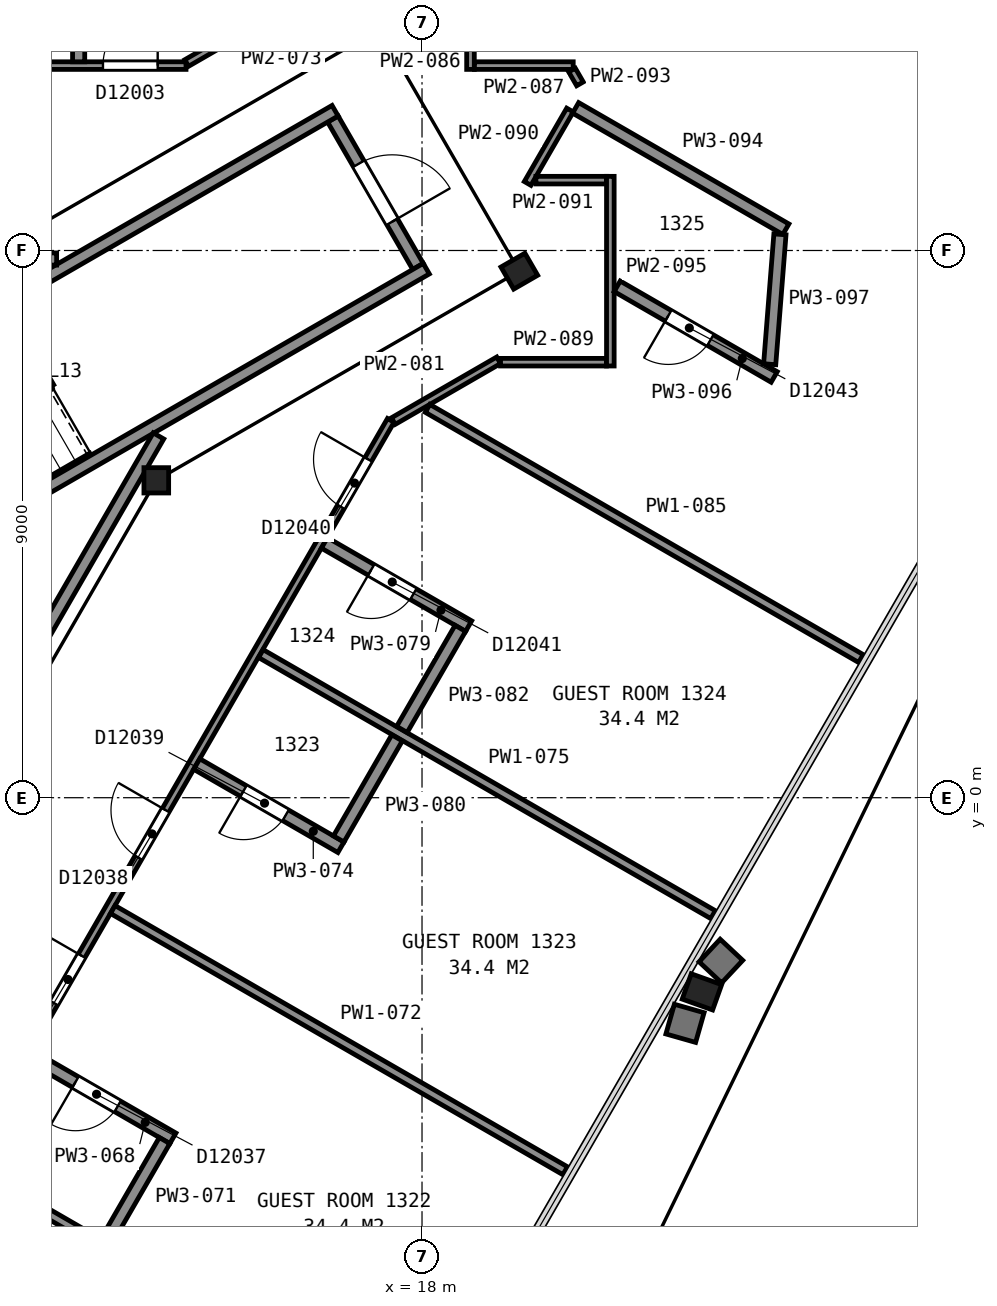
"""IFC4 building model, lengths in metres.
Left out: names, types, materials, properties, quantities, classifications, styles, units other than length and angle.
Written with IfcOpenShell. Run it as: python <this file> out.ifc"""

import sys

from ifc_helpers import new_model, si_unit, direction, frame, frame_2d, origin, origin_2d, place, context, subcontext, project, spatial, rectangle, i_section, extrude, element, fill, save


model = new_model("IFC4")
c1 = context("Model", 3, precision=1e-05, world=origin(), true_north=direction((0.0, 1.0)))
c2 = subcontext(c1, "Body", "Model", "MODEL_VIEW")
j1 = project(units=[si_unit("LENGTHUNIT", "METRE"), si_unit("PLANEANGLEUNIT", "RADIAN")], contexts=[c1])
p1 = place(None, origin())
s1 = spatial("IfcSite", under=j1, at=p1, CompositionType="ELEMENT")
p2 = place(p1, origin())
s2 = spatial("IfcBuilding", under=s1, at=p2, CompositionType="ELEMENT")
p3 = place(p2, frame((0.0, 0.0, 62.0)))
s3 = spatial("IfcBuildingStorey", under=s2, at=p3, CompositionType="ELEMENT", Elevation=62.0)
p4 = place(p3, frame((22.512, -3.161, 0.025), z_axis=(0.077516125089, -0.027689225938, 0.996606520708), x_axis=(-0.499992893591, -0.865902493262, 0.014831672882)))
e1 = element("IfcColumn", 1, at=p4, inside=s3, PredefinedType="COLUMN", context=c2, shape_type="SweptSolid", body=[
    extrude(i_section(OverallWidth=0.442, OverallDepth=0.531, WebThickness=0.066, FlangeThickness=0.106, FilletRadius=0.015, at=origin_2d()), origin(), (0.0, 0.0, 1.0), 3.562),
])
p5 = place(p3, frame((13.63, 5.22, 0.0), z_axis=(0.0, 0.0, 1.0), x_axis=(1.0, 0.0, 0.0)))
e2 = element("IfcColumn", 2, at=p5, inside=s3, PredefinedType="COLUMN", context=c2, shape_type="SweptSolid", body=[
    extrude(i_section(OverallWidth=0.406, OverallDepth=0.417, WebThickness=0.03, FlangeThickness=0.048, FilletRadius=0.015, at=origin_2d()), origin(), (0.0, 0.0, 1.0), 3.6),
])
p6 = place(p3, frame((19.6, 8.66, 0.0), z_axis=(0.0, 0.0, 1.0), x_axis=(0.5, -0.866025403784, 0.0)))
e3 = element("IfcColumn", 3, at=p6, inside=s3, PredefinedType="COLUMN", context=c2, shape_type="SweptSolid", body=[
    extrude(i_section(OverallWidth=0.419, OverallDepth=0.455, WebThickness=0.042, FlangeThickness=0.068, FilletRadius=0.015, at=origin_2d()), origin(), (0.0, 0.0, 1.0), 3.6),
])
p7 = place(p3, frame((17.934, 8.738, 0.0), z_axis=(0.0, 0.0, 1.0), x_axis=(-0.49998411664, 0.866034573852, 0.0)))
e4 = element("IfcWall", 4, at=p7, inside=s3, PredefinedType="PARTITIONING", context=c2, shape_type="SweptSolid", body=[
    extrude(rectangle(XDim=2.8, YDim=0.2, at=frame_2d((1.4, 0.0))), origin(), (0.0, 0.0, 1.0), 3.35),
])
p8 = place(p7, frame((0.85, 0.0, 0.0)))
e5 = element("IfcOpeningElement", 5, at=p8, cuts=e4, PredefinedType="OPENING", context=c2, shape_type="SweptSolid", body=[
    extrude(rectangle(XDim=1.1, YDim=2.1, at=frame_2d((0.55, 1.05))), frame((0.0, 0.11, 0.0), z_axis=(0.0, -1.0, 0.0), x_axis=(1.0, 0.0, 0.0)), (0.0, 0.0, 1.0), 0.22),
])
for number, where, z_axis, x_axis in (
    (6, (6.178, 5.299, 0.0), (0.0, 0.0, 1.0), (0.866, 0.5, 0.0)),
    (7, (7.678, 2.701, 0.0), (0.0, 0.0, 1.0), (0.866, 0.5, 0.0)),
):
    element("IfcWall", number, at=place(p3, frame(where, z_axis=z_axis, x_axis=x_axis)), inside=s3, PredefinedType="PARTITIONING", context=c2, shape_type="SweptSolid", body=[
        extrude(rectangle(XDim=12.0, YDim=0.2, at=frame_2d((6.0, 0.0))), origin(), (0.0, 0.0, 1.0), 3.35),
    ])
p9 = place(p3, frame((6.177, 8.86, 0.0), z_axis=(0.0, 0.0, 1.0), x_axis=(1.0, 0.0, 0.0)))
e8 = element("IfcWall", 8, at=p9, inside=s3, PredefinedType="PARTITIONING", context=c2, shape_type="SweptSolid", body=[
    extrude(rectangle(XDim=5.814, YDim=0.2, at=frame_2d((2.907, 0.0))), origin(), (0.0, 0.0, 1.0), 3.35),
])
p10 = place(p3, frame((8.492, -3.012, 0.0), z_axis=(0.0, 0.0, 1.0), x_axis=(0.499972957231, 0.866041016371, 0.0)))
e9 = element("IfcWall", 9, at=p10, inside=s3, PredefinedType="PARTITIONING", context=c2, shape_type="SweptSolid", body=[
    extrude(rectangle(XDim=10.349, YDim=0.2, at=frame_2d((5.174, 0.0))), origin(), (0.0, 0.0, 1.0), 3.35),
])
p11 = place(p3, frame((-9.036, 12.041, 0.0), z_axis=(0.0, 0.0, 1.0), x_axis=(1.0, 0.0, 0.0)))
e10 = element("IfcWall", 10, at=p11, inside=s3, PredefinedType="PARTITIONING", context=c2, shape_type="SweptSolid", body=[
    extrude(rectangle(XDim=23.154, YDim=0.125, at=frame_2d((11.577, 0.0))), origin(), (0.0, 0.0, 1.0), 2.613),
])
p12 = place(p11, frame((21.789, 0.0, 0.0)))
e11 = element("IfcOpeningElement", 11, at=p12, cuts=e10, PredefinedType="OPENING", context=c2, shape_type="SweptSolid", body=[
    extrude(rectangle(XDim=0.9, YDim=2.1, at=frame_2d((0.45, 1.05))), frame((0.0, 0.073, 0.0), z_axis=(0.0, -1.0, 0.0), x_axis=(1.0, 0.0, 0.0)), (0.0, 0.0, 1.0), 0.145),
])
p13 = place(p11, frame((15.375, 0.0, 0.0)))
e12 = element("IfcOpeningElement", 12, at=p13, cuts=e10, PredefinedType="OPENING", context=c2, shape_type="SweptSolid", body=[
    extrude(rectangle(XDim=0.9, YDim=2.1, at=frame_2d((0.45, 1.05))), frame((0.0, 0.073, 0.0), z_axis=(0.0, -1.0, 0.0), x_axis=(1.0, 0.0, 0.0)), (0.0, 0.0, 1.0), 0.145),
])
p14 = place(p11, frame((12.81, 0.0, 0.0)))
e13 = element("IfcOpeningElement", 13, at=p14, cuts=e10, PredefinedType="OPENING", context=c2, shape_type="SweptSolid", body=[
    extrude(rectangle(XDim=0.9, YDim=2.1, at=frame_2d((0.45, 1.05))), frame((0.0, 0.073, 0.0), z_axis=(0.0, -1.0, 0.0), x_axis=(1.0, 0.0, 0.0)), (0.0, 0.0, 1.0), 0.145),
])
p15 = place(p11, frame((6.046, 0.0, 0.0)))
e14 = element("IfcOpeningElement", 14, at=p15, cuts=e10, PredefinedType="OPENING", context=c2, shape_type="SweptSolid", body=[
    extrude(rectangle(XDim=0.9, YDim=2.1, at=frame_2d((0.45, 1.05))), frame((0.0, 0.073, 0.0), z_axis=(0.0, -1.0, 0.0), x_axis=(1.0, 0.0, 0.0)), (0.0, 0.0, 1.0), 0.145),
])
p16 = place(p11, frame((3.224, 0.0, 0.0)))
e15 = element("IfcOpeningElement", 15, at=p16, cuts=e10, PredefinedType="OPENING", context=c2, shape_type="SweptSolid", body=[
    extrude(rectangle(XDim=0.9, YDim=2.1, at=frame_2d((0.45, 1.05))), frame((0.0, 0.073, 0.0), z_axis=(0.0, -1.0, 0.0), x_axis=(1.0, 0.0, 0.0)), (0.0, 0.0, 1.0), 0.145),
])
p17 = place(p3, frame((17.486, 6.206, 0.0), z_axis=(0.0, 0.0, 1.0), x_axis=(-0.499990458811, -0.866030912322, 0.0)))
e16 = element("IfcWall", 16, at=p17, inside=s3, PredefinedType="PARTITIONING", context=c2, shape_type="SweptSolid", body=[
    extrude(rectangle(XDim=27.441, YDim=0.125, at=frame_2d((13.721, 0.0))), origin(), (0.0, 0.0, 1.0), 2.613),
])
p18 = place(p17, frame((20.529, 0.0, 0.0)))
e17 = element("IfcOpeningElement", 17, at=p18, cuts=e16, PredefinedType="OPENING", context=c2, shape_type="SweptSolid", body=[
    extrude(rectangle(XDim=0.9, YDim=2.1, at=frame_2d((0.45, 1.05))), frame((0.0, 0.073, 0.0), z_axis=(0.0, -1.0, 0.0), x_axis=(1.0, 0.0, 0.0)), (0.0, 0.0, 1.0), 0.145),
])
p19 = place(p17, frame((17.516, 0.0, 0.0)))
e18 = element("IfcOpeningElement", 18, at=p19, cuts=e16, PredefinedType="OPENING", context=c2, shape_type="SweptSolid", body=[
    extrude(rectangle(XDim=0.9, YDim=2.1, at=frame_2d((0.45, 1.05))), frame((0.0, 0.073, 0.0), z_axis=(0.0, -1.0, 0.0), x_axis=(1.0, 0.0, 0.0)), (0.0, 0.0, 1.0), 0.145),
])
p20 = place(p17, frame((10.168, 0.0, 0.0)))
e19 = element("IfcOpeningElement", 19, at=p20, cuts=e16, PredefinedType="OPENING", context=c2, shape_type="SweptSolid", body=[
    extrude(rectangle(XDim=0.9, YDim=2.1, at=frame_2d((0.45, 1.05))), frame((0.0, 0.073, 0.0), z_axis=(0.0, -1.0, 0.0), x_axis=(1.0, 0.0, 0.0)), (0.0, 0.0, 1.0), 0.145),
])
p21 = place(p17, frame((7.403, 0.0, 0.0)))
e20 = element("IfcOpeningElement", 20, at=p21, cuts=e16, PredefinedType="OPENING", context=c2, shape_type="SweptSolid", body=[
    extrude(rectangle(XDim=0.9, YDim=2.1, at=frame_2d((0.45, 1.05))), frame((0.0, 0.073, 0.0), z_axis=(0.0, -1.0, 0.0), x_axis=(1.0, 0.0, 0.0)), (0.0, 0.0, 1.0), 0.145),
])
p22 = place(p17, frame((0.741, 0.0, 0.0)))
e21 = element("IfcOpeningElement", 21, at=p22, cuts=e16, PredefinedType="OPENING", context=c2, shape_type="SweptSolid", body=[
    extrude(rectangle(XDim=0.9, YDim=2.1, at=frame_2d((0.45, 1.05))), frame((0.0, 0.073, 0.0), z_axis=(0.0, -1.0, 0.0), x_axis=(1.0, 0.0, 0.0)), (0.0, 0.0, 1.0), 0.145),
])
p23 = place(p3, frame((10.482, -6.051, 0.0), z_axis=(0.0, 0.0, 1.0), x_axis=(0.865978298045, -0.500081580659, 0.0)))
e22 = element("IfcWall", 22, at=p23, inside=s3, PredefinedType="PARTITIONING", context=c2, shape_type="SweptSolid", body=[
    extrude(rectangle(XDim=8.591, YDim=0.15, at=frame_2d((4.296, 0.0))), origin(), (0.0, 0.0, 1.0), 2.613),
])
p24 = place(p3, frame((13.903, -5.602, 0.0), z_axis=(0.0, 0.0, 1.0), x_axis=(-0.86596722502, 0.50010075504, 0.0)))
e23 = element("IfcWall", 23, at=p24, inside=s3, PredefinedType="PARTITIONING", context=c2, shape_type="SweptSolid", body=[
    extrude(rectangle(XDim=2.737, YDim=0.2, at=frame_2d((1.369, 0.0))), origin(), (0.0, 0.0, 1.0), 2.613),
])
p25 = place(p24, frame((1.05, 0.0, 0.0)))
e24 = element("IfcOpeningElement", 24, at=p25, cuts=e23, PredefinedType="OPENING", context=c2, shape_type="SweptSolid", body=[
    extrude(rectangle(XDim=0.8, YDim=2.1, at=frame_2d((0.4, 1.05))), frame((0.0, 0.11, 0.0), z_axis=(0.0, -1.0, 0.0), x_axis=(1.0, 0.0, 0.0)), (0.0, 0.0, 1.0), 0.22),
])
p26 = place(p3, frame((12.353, 12.104, 0.0), z_axis=(0.0, 0.0, 1.0), x_axis=(0.0, 1.0, 0.0)))
e25 = element("IfcWall", 25, at=p26, inside=s3, PredefinedType="PARTITIONING", context=c2, shape_type="SweptSolid", body=[
    extrude(rectangle(XDim=2.837, YDim=0.2, at=frame_2d((1.419, 0.0))), origin(), (0.0, 0.0, 1.0), 2.613),
])
p27 = place(p3, frame((12.803, -7.305, 0.0), z_axis=(0.0, 0.0, 1.0), x_axis=(0.500150762069, 0.865938343765, 0.0)))
e26 = element("IfcWall", 26, at=p27, inside=s3, PredefinedType="PARTITIONING", context=c2, shape_type="SweptSolid", body=[
    extrude(rectangle(XDim=1.924, YDim=0.2, at=frame_2d((0.962, 0.0))), origin(), (0.0, 0.0, 1.0), 2.613),
])
p28 = place(p3, frame((12.914, -1.839, 0.0), z_axis=(0.0, 0.0, 1.0), x_axis=(0.866010015463, -0.500026652407, 0.0)))
e27 = element("IfcWall", 27, at=p28, inside=s3, PredefinedType="PARTITIONING", context=c2, shape_type="SweptSolid", body=[
    extrude(rectangle(XDim=8.591, YDim=0.15, at=frame_2d((4.296, 0.0))), origin(), (0.0, 0.0, 1.0), 2.613),
])
p29 = place(p3, frame((14.13, 12.083, 0.0), z_axis=(0.0, 0.0, 1.0), x_axis=(0.865936922628, 0.500153222552, 0.0)))
e28 = element("IfcWall", 28, at=p29, inside=s3, PredefinedType="PARTITIONING", context=c2, shape_type="SweptSolid", body=[
    extrude(rectangle(XDim=1.995, YDim=0.125, at=frame_2d((0.998, 0.0))), origin(), (0.0, 0.0, 1.0), 2.613),
])
p30 = place(p3, frame((14.295, 0.554, 0.0), z_axis=(0.0, 0.0, 1.0), x_axis=(0.866095017657, -0.499879405846, 0.0)))
e29 = element("IfcWall", 29, at=p30, inside=s3, PredefinedType="PARTITIONING", context=c2, shape_type="SweptSolid", body=[
    extrude(rectangle(XDim=2.738, YDim=0.2, at=frame_2d((1.369, 0.0))), origin(), (0.0, 0.0, 1.0), 2.613),
])
p31 = place(p30, frame((0.887, 0.0, 0.0)))
e30 = element("IfcOpeningElement", 30, at=p31, cuts=e29, PredefinedType="OPENING", context=c2, shape_type="SweptSolid", body=[
    extrude(rectangle(XDim=0.8, YDim=2.1, at=frame_2d((0.4, 1.05))), frame((0.0, 0.11, 0.0), z_axis=(0.0, -1.0, 0.0), x_axis=(1.0, 0.0, 0.0)), (0.0, 0.0, 1.0), 0.22),
])
p32 = place(p3, frame((15.349, 2.37, 0.0), z_axis=(0.0, 0.0, 1.0), x_axis=(0.866033609522, -0.499985786976, 0.0)))
e31 = element("IfcWall", 31, at=p32, inside=s3, PredefinedType="PARTITIONING", context=c2, shape_type="SweptSolid", body=[
    extrude(rectangle(XDim=8.587, YDim=0.15, at=frame_2d((4.293, 0.0))), origin(), (0.0, 0.0, 1.0), 2.613),
])
p33 = place(p3, frame((18.767, 2.822, 0.0), z_axis=(0.0, 0.0, 1.0), x_axis=(-0.866117296485, 0.499840803386, 0.0)))
e32 = element("IfcWall", 32, at=p33, inside=s3, PredefinedType="PARTITIONING", context=c2, shape_type="SweptSolid", body=[
    extrude(rectangle(XDim=2.738, YDim=0.2, at=frame_2d((1.369, 0.0))), origin(), (0.0, 0.0, 1.0), 2.613),
])
p34 = place(p33, frame((1.051, 0.0, 0.0)))
e33 = element("IfcOpeningElement", 33, at=p34, cuts=e32, PredefinedType="OPENING", context=c2, shape_type="SweptSolid", body=[
    extrude(rectangle(XDim=0.8, YDim=2.1, at=frame_2d((0.4, 1.05))), frame((0.0, 0.11, 0.0), z_axis=(0.0, -1.0, 0.0), x_axis=(1.0, 0.0, 0.0)), (0.0, 0.0, 1.0), 0.22),
])
p35 = place(p3, frame((16.63, -0.678, 0.0), z_axis=(0.0, 0.0, 1.0), x_axis=(0.49992795321, 0.866066996022, 0.0)))
e34 = element("IfcWall", 34, at=p35, inside=s3, PredefinedType="PARTITIONING", context=c2, shape_type="SweptSolid", body=[
    extrude(rectangle(XDim=1.92, YDim=0.2, at=frame_2d((0.96, 0.0))), origin(), (0.0, 0.0, 1.0), 2.613),
])
p36 = place(p3, frame((17.529, 6.195, 0.0), z_axis=(0.0, 0.0, 1.0), x_axis=(0.866002566612, 0.500039553057, 0.0)))
e35 = element("IfcWall", 35, at=p36, inside=s3, PredefinedType="PARTITIONING", context=c2, shape_type="SweptSolid", body=[
    extrude(rectangle(XDim=1.999, YDim=0.125, at=frame_2d((1.0, 0.0))), origin(), (0.0, 0.0, 1.0), 2.613),
])
p37 = place(p3, frame((17.669, 1.123, 0.0), z_axis=(0.0, 0.0, 1.0), x_axis=(0.500269123289, 0.865869969617, 0.0)))
e36 = element("IfcWall", 36, at=p37, inside=s3, PredefinedType="PARTITIONING", context=c2, shape_type="SweptSolid", body=[
    extrude(rectangle(XDim=1.92, YDim=0.2, at=frame_2d((0.96, 0.0))), origin(), (0.0, 0.0, 1.0), 2.613),
])
p38 = place(p3, frame((18.091, 6.403, 0.0), z_axis=(0.0, 0.0, 1.0), x_axis=(0.866038366034, -0.499977548053, 0.0)))
e37 = element("IfcWall", 37, at=p38, inside=s3, PredefinedType="PARTITIONING", context=c2, shape_type="SweptSolid", body=[
    extrude(rectangle(XDim=8.229, YDim=0.15, at=frame_2d((4.115, 0.0))), origin(), (0.0, 0.0, 1.0), 2.613),
])
p39 = place(p3, frame((18.797, 14.072, 0.0), z_axis=(0.0, 0.0, 1.0), x_axis=(0.0, -1.0, 0.0)))
e38 = element("IfcWall", 38, at=p39, inside=s3, PredefinedType="PARTITIONING", context=c2, shape_type="SweptSolid", body=[
    extrude(rectangle(XDim=2.094, YDim=0.125, at=frame_2d((1.047, 0.0))), origin(), (0.0, 0.0, 1.0), 2.613),
])
p40 = place(p39, frame((0.531, 0.0, 0.0)))
e39 = element("IfcOpeningElement", 39, at=p40, cuts=e38, PredefinedType="OPENING", context=c2, shape_type="SweptSolid", body=[
    extrude(rectangle(XDim=0.9, YDim=2.1, at=frame_2d((0.45, 1.05))), frame((0.0, 0.073, 0.0), z_axis=(0.0, -1.0, 0.0), x_axis=(1.0, 0.0, 0.0)), (0.0, 0.0, 1.0), 0.145),
])
p41 = place(p3, frame((18.862, 12.041, 0.0), z_axis=(0.0, 0.0, 1.0), x_axis=(1.0, 0.0, 0.0)))
e40 = element("IfcWall", 40, at=p41, inside=s3, PredefinedType="PARTITIONING", context=c2, shape_type="SweptSolid", body=[
    extrude(rectangle(XDim=1.625, YDim=0.125, at=frame_2d((0.812, 0.0))), origin(), (0.0, 0.0, 1.0), 2.613),
])
p42 = place(p3, frame((19.291, 7.163, 0.0), z_axis=(0.0, 0.0, 1.0), x_axis=(1.0, 0.0, 0.0)))
e41 = element("IfcWall", 41, at=p42, inside=s3, PredefinedType="PARTITIONING", context=c2, shape_type="SweptSolid", body=[
    extrude(rectangle(XDim=1.741, YDim=0.125, at=frame_2d((0.871, 0.0))), origin(), (0.0, 0.0, 1.0), 2.613),
])
p43 = place(p3, frame((19.737, 10.103, 0.0), z_axis=(0.0, 0.0, 1.0), x_axis=(0.499944854726, 0.866057239582, 0.0)))
e42 = element("IfcWall", 42, at=p43, inside=s3, PredefinedType="PARTITIONING", context=c2, shape_type="SweptSolid", body=[
    extrude(rectangle(XDim=1.394, YDim=0.125, at=frame_2d((0.697, 0.0))), origin(), (0.0, 0.0, 1.0), 2.613),
])
p44 = place(p3, frame((19.873, 10.157, 0.0), z_axis=(0.0, 0.0, 1.0), x_axis=(1.0, 0.0, 0.0)))
e43 = element("IfcWall", 43, at=p44, inside=s3, PredefinedType="PARTITIONING", context=c2, shape_type="SweptSolid", body=[
    extrude(rectangle(XDim=1.159, YDim=0.125, at=frame_2d((0.58, 0.0))), origin(), (0.0, 0.0, 1.0), 2.613),
])
p45 = place(p3, frame((20.467, 11.967, 0.0), z_axis=(0.0, 0.0, 1.0), x_axis=(0.500153222552, -0.865936922628, 0.0)))
e44 = element("IfcWall", 44, at=p45, inside=s3, PredefinedType="PARTITIONING", context=c2, shape_type="SweptSolid", body=[
    extrude(rectangle(XDim=0.262, YDim=0.125, at=frame_2d((0.131, 0.0))), origin(), (0.0, 0.0, 1.0), 2.613),
])
p46 = place(p3, frame((20.526, 11.346, 0.0), z_axis=(0.0, 0.0, 1.0), x_axis=(0.866089865591, -0.499888332251, 0.0)))
e45 = element("IfcWall", 45, at=p46, inside=s3, PredefinedType="PARTITIONING", context=c2, shape_type="SweptSolid", body=[
    extrude(rectangle(XDim=3.992, YDim=0.2, at=frame_2d((1.996, 0.0))), origin(), (0.0, 0.0, 1.0), 2.613),
])
p47 = place(p3, frame((21.097, 7.101, 0.0), z_axis=(0.0, 0.0, 1.0), x_axis=(0.0, 1.0, 0.0)))
e46 = element("IfcWall", 46, at=p47, inside=s3, PredefinedType="PARTITIONING", context=c2, shape_type="SweptSolid", body=[
    extrude(rectangle(XDim=3.119, YDim=0.125, at=frame_2d((1.56, 0.0))), origin(), (0.0, 0.0, 1.0), 2.613),
])
p48 = place(p3, frame((21.209, 8.411, 0.0), z_axis=(0.0, 0.0, 1.0), x_axis=(0.86595648724, -0.500119347963, 0.0)))
e47 = element("IfcWall", 47, at=p48, inside=s3, PredefinedType="PARTITIONING", context=c2, shape_type="SweptSolid", body=[
    extrude(rectangle(XDim=2.982, YDim=0.2, at=frame_2d((1.491, 0.0))), origin(), (0.0, 0.0, 1.0), 2.613),
])
p49 = place(p48, frame((0.97, 0.0, 0.0)))
e48 = element("IfcOpeningElement", 48, at=p49, cuts=e47, PredefinedType="OPENING", context=c2, shape_type="SweptSolid", body=[
    extrude(rectangle(XDim=0.8, YDim=2.1, at=frame_2d((0.4, 1.05))), frame((0.0, 0.11, 0.0), z_axis=(0.0, -1.0, 0.0), x_axis=(1.0, 0.0, 0.0)), (0.0, 0.0, 1.0), 0.22),
])
p50 = place(p3, frame((23.718, 7.129, 0.0), z_axis=(0.0, 0.0, 1.0), x_axis=(0.078848500899, 0.996886610355, 0.0)))
e49 = element("IfcWall", 49, at=p50, inside=s3, PredefinedType="PARTITIONING", context=c2, shape_type="SweptSolid", body=[
    extrude(rectangle(XDim=2.143, YDim=0.2, at=frame_2d((1.071, 0.0))), origin(), (0.0, 0.0, 1.0), 2.613),
])
p51 = place(p8, origin())
e50 = element("IfcDoor", 50, at=p51, inside=s3, OperationType="SINGLE_SWING_LEFT", PredefinedType="DOOR", context=c2, shape_type="SweptSolid", body=[
    extrude(rectangle(XDim=1.1, YDim=2.1, at=frame_2d((0.55, 1.05))), frame((0.0, 0.025, 0.0), z_axis=(0.0, -1.0, 0.0), x_axis=(1.0, 0.0, 0.0)), (0.0, 0.0, 1.0), 0.05),
])
fill(e5, e50)
p52 = place(p12, origin())
e51 = element("IfcDoor", 51, at=p52, inside=s3, OperationType="SINGLE_SWING_RIGHT", PredefinedType="DOOR", context=c2, shape_type="SweptSolid", body=[
    extrude(rectangle(XDim=0.9, YDim=2.1, at=frame_2d((0.45, 1.05))), frame((0.0, 0.025, 0.0), z_axis=(0.0, -1.0, 0.0), x_axis=(1.0, 0.0, 0.0)), (0.0, 0.0, 1.0), 0.05),
])
fill(e11, e51)
p53 = place(p20, origin())
e52 = element("IfcDoor", 52, at=p53, inside=s3, OperationType="SINGLE_SWING_LEFT", PredefinedType="DOOR", context=c2, shape_type="SweptSolid", body=[
    extrude(rectangle(XDim=0.9, YDim=2.1, at=frame_2d((0.45, 1.05))), frame((0.0, 0.025, 0.0), z_axis=(0.0, -1.0, 0.0), x_axis=(1.0, 0.0, 0.0)), (0.0, 0.0, 1.0), 0.05),
])
fill(e19, e52)
p54 = place(p21, origin())
e53 = element("IfcDoor", 53, at=p54, inside=s3, OperationType="SINGLE_SWING_LEFT", PredefinedType="DOOR", context=c2, shape_type="SweptSolid", body=[
    extrude(rectangle(XDim=0.9, YDim=2.1, at=frame_2d((0.45, 1.05))), frame((0.0, 0.025, 0.0), z_axis=(0.0, -1.0, 0.0), x_axis=(1.0, 0.0, 0.0)), (0.0, 0.0, 1.0), 0.05),
])
fill(e20, e53)
p55 = place(p22, origin())
e54 = element("IfcDoor", 54, at=p55, inside=s3, OperationType="SINGLE_SWING_LEFT", PredefinedType="DOOR", context=c2, shape_type="SweptSolid", body=[
    extrude(rectangle(XDim=0.9, YDim=2.1, at=frame_2d((0.45, 1.05))), frame((0.0, 0.025, 0.0), z_axis=(0.0, -1.0, 0.0), x_axis=(1.0, 0.0, 0.0)), (0.0, 0.0, 1.0), 0.05),
])
fill(e21, e54)
p56 = place(p25, origin())
e55 = element("IfcDoor", 55, at=p56, inside=s3, OperationType="SINGLE_SWING_RIGHT", PredefinedType="DOOR", context=c2, shape_type="SweptSolid", body=[
    extrude(rectangle(XDim=0.8, YDim=2.1, at=frame_2d((0.4, 1.05))), frame((0.0, 0.025, 0.0), z_axis=(0.0, -1.0, 0.0), x_axis=(1.0, 0.0, 0.0)), (0.0, 0.0, 1.0), 0.05),
])
fill(e24, e55)
p57 = place(p31, origin())
e56 = element("IfcDoor", 56, at=p57, inside=s3, OperationType="SINGLE_SWING_LEFT", PredefinedType="DOOR", context=c2, shape_type="SweptSolid", body=[
    extrude(rectangle(XDim=0.8, YDim=2.1, at=frame_2d((0.4, 1.05))), frame((0.0, 0.025, 0.0), z_axis=(0.0, -1.0, 0.0), x_axis=(1.0, 0.0, 0.0)), (0.0, 0.0, 1.0), 0.05),
])
fill(e30, e56)
p58 = place(p34, origin())
e57 = element("IfcDoor", 57, at=p58, inside=s3, OperationType="SINGLE_SWING_RIGHT", PredefinedType="DOOR", context=c2, shape_type="SweptSolid", body=[
    extrude(rectangle(XDim=0.8, YDim=2.1, at=frame_2d((0.4, 1.05))), frame((0.0, 0.025, 0.0), z_axis=(0.0, -1.0, 0.0), x_axis=(1.0, 0.0, 0.0)), (0.0, 0.0, 1.0), 0.05),
])
fill(e33, e57)
p59 = place(p49, origin())
e58 = element("IfcDoor", 58, at=p59, inside=s3, OperationType="SINGLE_SWING_LEFT", PredefinedType="DOOR", context=c2, shape_type="SweptSolid", body=[
    extrude(rectangle(XDim=0.8, YDim=2.1, at=frame_2d((0.4, 1.05))), frame((0.0, 0.025, 0.0), z_axis=(0.0, -1.0, 0.0), x_axis=(1.0, 0.0, 0.0)), (0.0, 0.0, 1.0), 0.05),
])
fill(e48, e58)
save(model, sys.argv[1])
